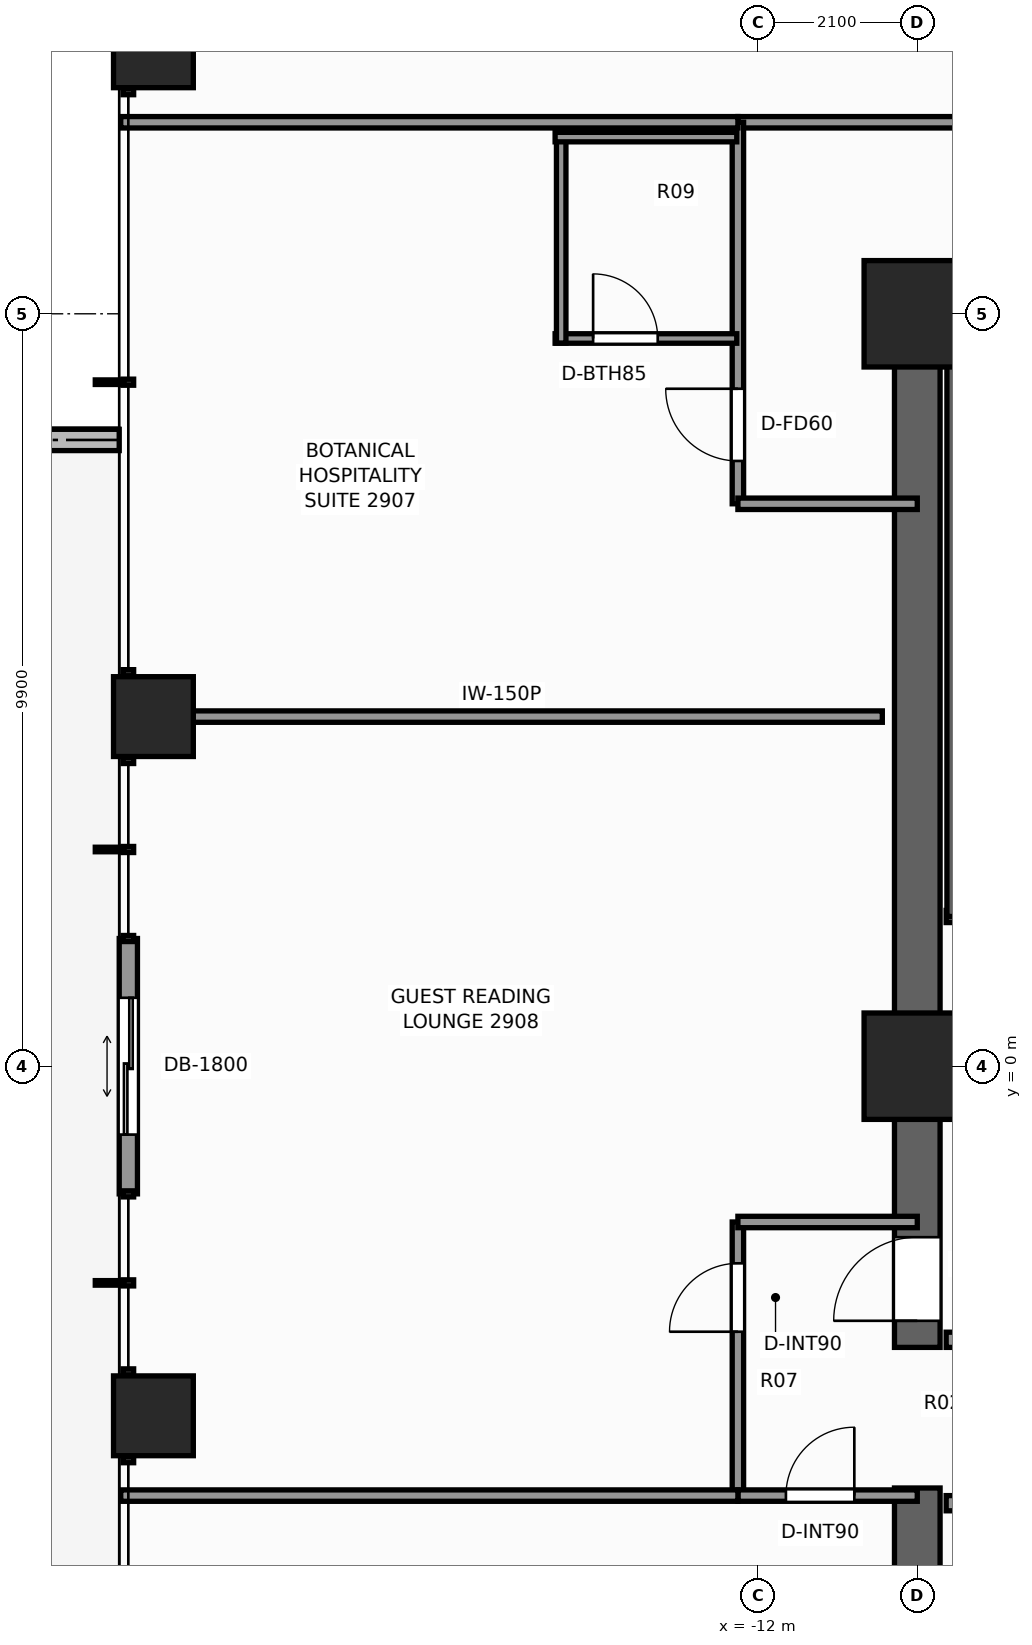
"""IFC4 building model, lengths in metres.
Left out: names, types, materials, properties, quantities, classifications, styles, units other than length and angle.
Written with IfcOpenShell. Run it as: python <this file> out.ifc"""

import sys

from ifc_helpers import new_model, si_unit, direction, frame, frame_2d, origin, origin_2d, place, context, subcontext, project, spatial, rectangle, extrude, element, fill, save


model = new_model("IFC4")
c1 = context("Model", 3, precision=1e-05, world=origin(), true_north=direction((0.0, 1.0)))
c2 = subcontext(c1, "Body", "Model", "MODEL_VIEW")
j1 = project(units=[si_unit("LENGTHUNIT", "METRE"), si_unit("PLANEANGLEUNIT", "RADIAN")], contexts=[c1])
p1 = place(None, origin())
s1 = spatial("IfcSite", under=j1, at=p1, CompositionType="ELEMENT")
p2 = place(p1, origin())
s2 = spatial("IfcBuilding", under=s1, at=p2, CompositionType="ELEMENT")
p3 = place(p2, frame((0.0, 0.0, 101.9)))
s3 = spatial("IfcBuildingStorey", under=s2, at=p3, CompositionType="ELEMENT", Elevation=101.9)
p4 = place(p3, frame((-10.2, 9.9, 0.0), z_axis=(0.0, 0.0, 1.0), x_axis=(1.0, 0.0, 0.0)))
e1 = element("IfcWall", 1, at=p4, inside=s3, PredefinedType="SHEAR", context=c2, shape_type="SweptSolid", body=[
    extrude(rectangle(XDim=14.62, YDim=0.6, at=frame_2d((7.31, 0.0))), origin(), (0.0, 0.0, 1.0), 3.3),
])
p5 = place(p3, frame((-9.9, -9.6, 0.0), z_axis=(0.0, 0.0, 1.0), x_axis=(0.0, 1.0, 0.0)))
e2 = element("IfcWall", 2, at=p5, inside=s3, PredefinedType="SHEAR", context=c2, shape_type="SweptSolid", body=[
    extrude(rectangle(XDim=4.05, YDim=0.6, at=frame_2d((2.025, 0.0))), origin(), (0.0, 0.0, 1.0), 3.3),
])
p6 = place(p3, frame((-9.9, -3.7, 0.0), z_axis=(0.0, 0.0, 1.0), x_axis=(0.0, 1.0, 0.0)))
e3 = element("IfcWall", 3, at=p6, inside=s3, PredefinedType="SHEAR", context=c2, shape_type="SweptSolid", body=[
    extrude(rectangle(XDim=13.3, YDim=0.6, at=frame_2d((6.65, 0.0))), origin(), (0.0, 0.0, 1.0), 3.3),
])
p7 = place(p6, frame((0.35, 0.0, 0.0)))
e4 = element("IfcOpeningElement", 4, at=p7, cuts=e3, PredefinedType="OPENING", context=c2, shape_type="SweptSolid", body=[
    extrude(rectangle(XDim=1.1, YDim=2.2, at=frame_2d((0.55, 1.1))), frame((0.0, 0.31, 0.0), z_axis=(0.0, -1.0, 0.0), x_axis=(1.0, 0.0, 0.0)), (0.0, 0.0, 1.0), 0.62),
])
for number, where, z_axis, x_axis in (
    (5, (-9.9, 9.9, 0.0), (0.0, 0.0, 1.0), (1.0, 0.0, 0.0)),
    (6, (-9.9, 0.0, 0.0), (0.0, 0.0, 1.0), (1.0, 0.0, 0.0)),
):
    element("IfcColumn", number, at=place(p3, frame(where, z_axis=z_axis, x_axis=x_axis)), inside=s3, PredefinedType="COLUMN", context=c2, shape_type="SweptSolid", body=[
        extrude(rectangle(XDim=1.4, YDim=1.4, at=origin_2d()), origin(), (0.0, 0.0, 1.0), 3.3),
    ])
for number, where, z_axis, x_axis in (
    (7, (-19.95, -4.6, 0.0), (0.0, 0.0, 1.0), (1.0, 0.0, 0.0)),
    (8, (-19.95, 4.6, 0.0), (0.0, 0.0, 1.0), (1.0, 0.0, 0.0)),
    (9, (-19.95, 13.4, 0.0), (0.0, 0.0, 1.0), (1.0, 0.0, 0.0)),
):
    element("IfcColumn", number, at=place(p3, frame(where, z_axis=z_axis, x_axis=x_axis)), inside=s3, PredefinedType="COLUMN", context=c2, shape_type="SweptSolid", body=[
        extrude(rectangle(XDim=1.05, YDim=1.05, at=origin_2d()), origin(), (0.0, 0.0, 1.0), 3.3),
    ])
p8 = place(p3, frame((-20.4, 8.24, -0.04), z_axis=(0.0, 0.0, 1.0), x_axis=(-1.0, 0.0, 0.0)))
e10 = element("IfcWall", 10, at=p8, inside=s3, PredefinedType="PARAPET", context=c2, shape_type="SweptSolid", body=[
    extrude(rectangle(XDim=3.214, YDim=0.28, at=frame_2d((1.607, 0.0))), origin(), (0.0, 0.0, 1.0), 0.42),
])
p9 = place(p3, frame((-20.28, -1.68, 0.0), z_axis=(0.0, 0.0, 1.0), x_axis=(0.0, 1.0, 0.0)))
e11 = element("IfcWall", 11, at=p9, inside=s3, PredefinedType="STANDARD", context=c2, shape_type="SweptSolid", body=[
    extrude(rectangle(XDim=3.36, YDim=0.24, at=frame_2d((1.68, 0.0))), origin(), (0.0, 0.0, 1.0), 3.08),
])
p10 = place(p9, frame((0.78, 0.0, 0.0)))
e12 = element("IfcOpeningElement", 12, at=p10, cuts=e11, PredefinedType="OPENING", context=c2, shape_type="SweptSolid", body=[
    extrude(rectangle(XDim=1.8, YDim=2.2, at=frame_2d((0.9, 1.1))), frame((0.0, 0.13, 0.0), z_axis=(0.0, -1.0, 0.0), x_axis=(1.0, 0.0, 0.0)), (0.0, 0.0, 1.0), 0.26),
])
p11 = place(p3, frame((-9.52, 1.97, 0.0), z_axis=(0.0, 0.0, 1.0), x_axis=(1.0, 0.0, 0.0)))
e13 = element("IfcWall", 13, at=p11, inside=s3, PredefinedType="SHEAR", context=c2, shape_type="SweptSolid", body=[
    extrude(rectangle(XDim=3.52, YDim=0.16, at=frame_2d((1.76, 0.0))), origin(), (0.0, 0.0, 1.0), 3.3),
])
p12 = place(p11, frame((1.15, 0.0, 0.0)))
e14 = element("IfcOpeningElement", 14, at=p12, cuts=e13, PredefinedType="OPENING", context=c2, shape_type="SweptSolid", body=[
    extrude(rectangle(XDim=1.1, YDim=2.2, at=frame_2d((0.55, 1.1))), frame((0.0, 0.09, 0.0), z_axis=(0.0, -1.0, 0.0), x_axis=(1.0, 0.0, 0.0)), (0.0, 0.0, 1.0), 0.18),
])
p13 = place(p3, frame((-9.52, 9.53, 0.0), z_axis=(0.0, 0.0, 1.0), x_axis=(1.0, 0.0, 0.0)))
e15 = element("IfcWall", 15, at=p13, inside=s3, PredefinedType="SHEAR", context=c2, shape_type="SweptSolid", body=[
    extrude(rectangle(XDim=3.52, YDim=0.16, at=frame_2d((1.76, 0.0))), origin(), (0.0, 0.0, 1.0), 3.3),
])
p14 = place(p3, frame((-9.43, 1.97, 0.0), z_axis=(0.0, 0.0, 1.0), x_axis=(0.0, 1.0, 0.0)))
e16 = element("IfcWall", 16, at=p14, inside=s3, PredefinedType="SHEAR", context=c2, shape_type="SweptSolid", body=[
    extrude(rectangle(XDim=7.56, YDim=0.16, at=frame_2d((3.78, 0.0))), origin(), (0.0, 0.0, 1.0), 3.3),
])
p15 = place(p3, frame((-9.52, -3.6, 0.0), z_axis=(0.0, 0.0, 1.0), x_axis=(1.0, 0.0, 0.0)))
e17 = element("IfcWall", 17, at=p15, inside=s3, PredefinedType="SOLIDWALL", context=c2, shape_type="SweptSolid", body=[
    extrude(rectangle(XDim=3.77, YDim=0.2, at=frame_2d((1.885, 0.0))), origin(), (0.0, 0.0, 1.0), 3.08),
])
p16 = place(p15, frame((1.15, 0.0, 0.0)))
e18 = element("IfcOpeningElement", 18, at=p16, cuts=e17, PredefinedType="OPENING", context=c2, shape_type="SweptSolid", body=[
    extrude(rectangle(XDim=0.95, YDim=2.06, at=frame_2d((0.475, 1.03))), frame((0.0, 0.11, 0.0), z_axis=(0.0, -1.0, 0.0), x_axis=(1.0, 0.0, 0.0)), (0.0, 0.0, 1.0), 0.22),
])
p17 = place(p3, frame((-9.52, -5.75, 0.0), z_axis=(0.0, 0.0, 1.0), x_axis=(1.0, 0.0, 0.0)))
e19 = element("IfcWall", 19, at=p17, inside=s3, PredefinedType="SOLIDWALL", context=c2, shape_type="SweptSolid", body=[
    extrude(rectangle(XDim=5.66, YDim=0.2, at=frame_2d((2.83, 0.0))), origin(), (0.0, 0.0, 1.0), 3.08),
])
p18 = place(p17, frame((0.55, 0.0, 0.0)))
e20 = element("IfcOpeningElement", 20, at=p18, cuts=e19, PredefinedType="OPENING", context=c2, shape_type="SweptSolid", body=[
    extrude(rectangle(XDim=1.1, YDim=2.2, at=frame_2d((0.55, 1.1))), frame((0.0, 0.11, 0.0), z_axis=(0.0, -1.0, 0.0), x_axis=(1.0, 0.0, 0.0)), (0.0, 0.0, 1.0), 0.22),
])
p19 = place(p17, frame((2.48, 0.0, 0.0)))
e21 = element("IfcOpeningElement", 21, at=p19, cuts=e19, PredefinedType="OPENING", context=c2, shape_type="SweptSolid", body=[
    extrude(rectangle(XDim=1.1, YDim=2.2, at=frame_2d((0.55, 1.1))), frame((0.0, 0.11, 0.0), z_axis=(0.0, -1.0, 0.0), x_axis=(1.0, 0.0, 0.0)), (0.0, 0.0, 1.0), 0.22),
])
p20 = place(p17, frame((4.41, 0.0, 0.0)))
e22 = element("IfcOpeningElement", 22, at=p20, cuts=e19, PredefinedType="OPENING", context=c2, shape_type="SweptSolid", body=[
    extrude(rectangle(XDim=1.1, YDim=2.2, at=frame_2d((0.55, 1.1))), frame((0.0, 0.11, 0.0), z_axis=(0.0, -1.0, 0.0), x_axis=(1.0, 0.0, 0.0)), (0.0, 0.0, 1.0), 0.22),
])
p21 = place(p3, frame((-12.26, 12.42, 0.0), z_axis=(0.0, 0.0, 1.0), x_axis=(1.0, 0.0, 0.0)))
e23 = element("IfcWall", 23, at=p21, inside=s3, PredefinedType="PARTITIONING", context=c2, shape_type="SweptSolid", body=[
    extrude(rectangle(XDim=24.52, YDim=0.15, at=frame_2d((12.26, 0.0))), origin(), (0.0, 0.0, 1.0), 2.292),
])
p22 = place(p21, frame((3.427, 0.0, 0.0)))
e24 = element("IfcOpeningElement", 24, at=p22, cuts=e23, PredefinedType="OPENING", context=c2, shape_type="SweptSolid", body=[
    extrude(rectangle(XDim=0.9, YDim=2.06, at=frame_2d((0.45, 1.03))), frame((0.0, 0.085, 0.0), z_axis=(0.0, -1.0, 0.0), x_axis=(1.0, 0.0, 0.0)), (0.0, 0.0, 1.0), 0.17),
])
p23 = place(p21, frame((9.78, 0.0, 0.0)))
e25 = element("IfcOpeningElement", 25, at=p23, cuts=e23, PredefinedType="OPENING", context=c2, shape_type="SweptSolid", body=[
    extrude(rectangle(XDim=0.9, YDim=2.06, at=frame_2d((0.45, 1.03))), frame((0.0, 0.085, 0.0), z_axis=(0.0, -1.0, 0.0), x_axis=(1.0, 0.0, 0.0)), (0.0, 0.0, 1.0), 0.17),
])
p24 = place(p21, frame((19.345, 0.0, 0.0)))
e26 = element("IfcOpeningElement", 26, at=p24, cuts=e23, PredefinedType="OPENING", context=c2, shape_type="SweptSolid", body=[
    extrude(rectangle(XDim=0.9, YDim=2.06, at=frame_2d((0.45, 1.03))), frame((0.0, 0.085, 0.0), z_axis=(0.0, -1.0, 0.0), x_axis=(1.0, 0.0, 0.0)), (0.0, 0.0, 1.0), 0.17),
])
p25 = place(p3, frame((-12.26, 7.4, 0.0), z_axis=(0.0, 0.0, 1.0), x_axis=(0.0, 1.0, 0.0)))
e27 = element("IfcWall", 27, at=p25, inside=s3, PredefinedType="PARTITIONING", context=c2, shape_type="SweptSolid", body=[
    extrude(rectangle(XDim=5.02, YDim=0.15, at=frame_2d((2.51, 0.0))), origin(), (0.0, 0.0, 1.0), 2.292),
])
p26 = place(p25, frame((0.564, 0.0, 0.0)))
e28 = element("IfcOpeningElement", 28, at=p26, cuts=e27, PredefinedType="OPENING", context=c2, shape_type="SweptSolid", body=[
    extrude(rectangle(XDim=0.95, YDim=2.06, at=frame_2d((0.475, 1.03))), frame((0.0, 0.085, 0.0), z_axis=(0.0, -1.0, 0.0), x_axis=(1.0, 0.0, 0.0)), (0.0, 0.0, 1.0), 0.17),
])
p27 = place(p3, frame((-12.26, 7.4, 0.0), z_axis=(0.0, 0.0, 1.0), x_axis=(1.0, 0.0, 0.0)))
e29 = element("IfcWall", 29, at=p27, inside=s3, PredefinedType="PARTITIONING", context=c2, shape_type="SweptSolid", body=[
    extrude(rectangle(XDim=2.36, YDim=0.15, at=frame_2d((1.18, 0.0))), origin(), (0.0, 0.0, 1.0), 3.08),
])
p28 = place(p3, frame((-12.26, -5.65, 0.0), z_axis=(0.0, 0.0, 1.0), x_axis=(0.0, 1.0, 0.0)))
e30 = element("IfcWall", 30, at=p28, inside=s3, PredefinedType="PARTITIONING", context=c2, shape_type="SweptSolid", body=[
    extrude(rectangle(XDim=3.6, YDim=0.15, at=frame_2d((1.8, 0.0))), origin(), (0.0, 0.0, 1.0), 2.292),
])
p29 = place(p28, frame((2.156, 0.0, 0.0)))
e31 = element("IfcOpeningElement", 31, at=p29, cuts=e30, PredefinedType="OPENING", context=c2, shape_type="SweptSolid", body=[
    extrude(rectangle(XDim=0.9, YDim=2.06, at=frame_2d((0.45, 1.03))), frame((0.0, 0.085, 0.0), z_axis=(0.0, -1.0, 0.0), x_axis=(1.0, 0.0, 0.0)), (0.0, 0.0, 1.0), 0.17),
])
p30 = place(p3, frame((-12.26, -2.05, 0.0), z_axis=(0.0, 0.0, 1.0), x_axis=(1.0, 0.0, 0.0)))
e32 = element("IfcWall", 32, at=p30, inside=s3, PredefinedType="PARTITIONING", context=c2, shape_type="SweptSolid", body=[
    extrude(rectangle(XDim=2.36, YDim=0.15, at=frame_2d((1.18, 0.0))), origin(), (0.0, 0.0, 1.0), 3.08),
])
p31 = place(p3, frame((-12.26, -5.65, 0.0), z_axis=(0.0, 0.0, 1.0), x_axis=(1.0, 0.0, 0.0)))
e33 = element("IfcWall", 33, at=p31, inside=s3, PredefinedType="PARTITIONING", context=c2, shape_type="SweptSolid", body=[
    extrude(rectangle(XDim=2.36, YDim=0.15, at=frame_2d((1.18, 0.0))), origin(), (0.0, 0.0, 1.0), 3.08),
])
p32 = place(p31, frame((0.632, 0.0, 0.0)))
e34 = element("IfcOpeningElement", 34, at=p32, cuts=e33, PredefinedType="OPENING", context=c2, shape_type="SweptSolid", body=[
    extrude(rectangle(XDim=0.9, YDim=2.06, at=frame_2d((0.45, 1.03))), frame((0.0, 0.085, 0.0), z_axis=(0.0, -1.0, 0.0), x_axis=(1.0, 0.0, 0.0)), (0.0, 0.0, 1.0), 0.17),
])
p33 = place(p3, frame((-20.38, 12.42, 0.0), z_axis=(0.0, 0.0, 1.0), x_axis=(1.0, 0.0, 0.0)))
e35 = element("IfcWall", 35, at=p33, inside=s3, PredefinedType="PARTITIONING", context=c2, shape_type="SweptSolid", body=[
    extrude(rectangle(XDim=8.12, YDim=0.15, at=frame_2d((4.06, 0.0))), origin(), (0.0, 0.0, 1.0), 2.292),
])
p34 = place(p3, frame((-20.38, 4.6, 0.0), z_axis=(0.0, 0.0, 1.0), x_axis=(1.0, 0.0, 0.0)))
e36 = element("IfcWall", 36, at=p34, inside=s3, PredefinedType="PARTITIONING", context=c2, shape_type="SweptSolid", body=[
    extrude(rectangle(XDim=10.02, YDim=0.15, at=frame_2d((5.01, 0.0))), origin(), (0.0, 0.0, 1.0), 2.292),
])
p35 = place(p3, frame((-20.38, -5.65, 0.0), z_axis=(0.0, 0.0, 1.0), x_axis=(1.0, 0.0, 0.0)))
e37 = element("IfcWall", 37, at=p35, inside=s3, PredefinedType="PARTITIONING", context=c2, shape_type="SweptSolid", body=[
    extrude(rectangle(XDim=8.12, YDim=0.15, at=frame_2d((4.06, 0.0))), origin(), (0.0, 0.0, 1.0), 2.449),
])
p36 = place(p3, frame((-14.665, 9.575, 0.0), z_axis=(0.0, 0.0, 1.0), x_axis=(1.0, 0.0, 0.0)))
e38 = element("IfcWall", 38, at=p36, inside=s3, PredefinedType="PARTITIONING", context=c2, shape_type="SweptSolid", body=[
    extrude(rectangle(XDim=2.39, YDim=0.125, at=frame_2d((1.195, 0.0))), origin(), (0.0, 0.0, 1.0), 3.08),
])
p37 = place(p36, frame((0.5, 0.0, 0.0)))
e39 = element("IfcOpeningElement", 39, at=p37, cuts=e38, PredefinedType="OPENING", context=c2, shape_type="SweptSolid", body=[
    extrude(rectangle(XDim=0.85, YDim=2.03, at=frame_2d((0.425, 1.015))), frame((0.0, 0.073, 0.0), z_axis=(0.0, -1.0, 0.0), x_axis=(1.0, 0.0, 0.0)), (0.0, 0.0, 1.0), 0.145),
])
p38 = place(p3, frame((-14.585, 9.515, 0.0), z_axis=(0.0, 0.0, 1.0), x_axis=(0.0, 1.0, 0.0)))
e40 = element("IfcWall", 40, at=p38, inside=s3, PredefinedType="PARTITIONING", context=c2, shape_type="SweptSolid", body=[
    extrude(rectangle(XDim=2.77, YDim=0.125, at=frame_2d((1.385, 0.0))), origin(), (0.0, 0.0, 1.0), 2.292),
])
p39 = place(p3, frame((-14.665, 12.225, 0.0), z_axis=(0.0, 0.0, 1.0), x_axis=(1.0, 0.0, 0.0)))
e41 = element("IfcWall", 41, at=p39, inside=s3, PredefinedType="PARTITIONING", context=c2, shape_type="SweptSolid", body=[
    extrude(rectangle(XDim=2.39, YDim=0.125, at=frame_2d((1.195, 0.0))), origin(), (0.0, 0.0, 1.0), 3.08),
])
p40 = place(p10, origin())
e42 = element("IfcDoor", 42, at=p40, inside=s3, OperationType="DOUBLE_DOOR_SLIDING", PredefinedType="DOOR", context=c2, shape_type="SweptSolid", body=[
    extrude(rectangle(XDim=1.8, YDim=2.2, at=frame_2d((0.9, 1.1))), frame((0.0, 0.025, 0.0), z_axis=(0.0, -1.0, 0.0), x_axis=(1.0, 0.0, 0.0)), (0.0, 0.0, 1.0), 0.05),
])
fill(e12, e42)
p41 = place(p7, origin())
e43 = element("IfcDoor", 43, at=p41, inside=s3, OperationType="SINGLE_SWING_LEFT", PredefinedType="DOOR", context=c2, shape_type="SweptSolid", body=[
    extrude(rectangle(XDim=1.1, YDim=2.2, at=frame_2d((0.55, 1.1))), frame((0.0, 0.025, 0.0), z_axis=(0.0, -1.0, 0.0), x_axis=(1.0, 0.0, 0.0)), (0.0, 0.0, 1.0), 0.05),
])
fill(e4, e43)
p42 = place(p37, origin())
e44 = element("IfcDoor", 44, at=p42, inside=s3, OperationType="SINGLE_SWING_LEFT", PredefinedType="DOOR", context=c2, shape_type="SweptSolid", body=[
    extrude(rectangle(XDim=0.85, YDim=2.03, at=frame_2d((0.425, 1.015))), frame((0.0, 0.025, 0.0), z_axis=(0.0, -1.0, 0.0), x_axis=(1.0, 0.0, 0.0)), (0.0, 0.0, 1.0), 0.05),
])
fill(e39, e44)
p43 = place(p26, origin())
e45 = element("IfcDoor", 45, at=p43, inside=s3, OperationType="SINGLE_SWING_RIGHT", PredefinedType="DOOR", context=c2, shape_type="SweptSolid", body=[
    extrude(rectangle(XDim=0.95, YDim=2.06, at=frame_2d((0.475, 1.03))), frame((0.0, 0.025, 0.0), z_axis=(0.0, -1.0, 0.0), x_axis=(1.0, 0.0, 0.0)), (0.0, 0.0, 1.0), 0.05),
])
fill(e28, e45)
p44 = place(p29, origin())
e46 = element("IfcDoor", 46, at=p44, inside=s3, OperationType="SINGLE_SWING_LEFT", PredefinedType="DOOR", context=c2, shape_type="SweptSolid", body=[
    extrude(rectangle(XDim=0.9, YDim=2.06, at=frame_2d((0.45, 1.03))), frame((0.0, 0.025, 0.0), z_axis=(0.0, -1.0, 0.0), x_axis=(1.0, 0.0, 0.0)), (0.0, 0.0, 1.0), 0.05),
])
fill(e31, e46)
p45 = place(p32, origin())
e47 = element("IfcDoor", 47, at=p45, inside=s3, OperationType="SINGLE_SWING_RIGHT", PredefinedType="DOOR", context=c2, shape_type="SweptSolid", body=[
    extrude(rectangle(XDim=0.9, YDim=2.06, at=frame_2d((0.45, 1.03))), frame((0.0, 0.025, 0.0), z_axis=(0.0, -1.0, 0.0), x_axis=(1.0, 0.0, 0.0)), (0.0, 0.0, 1.0), 0.05),
])
fill(e34, e47)
save(model, sys.argv[1])
